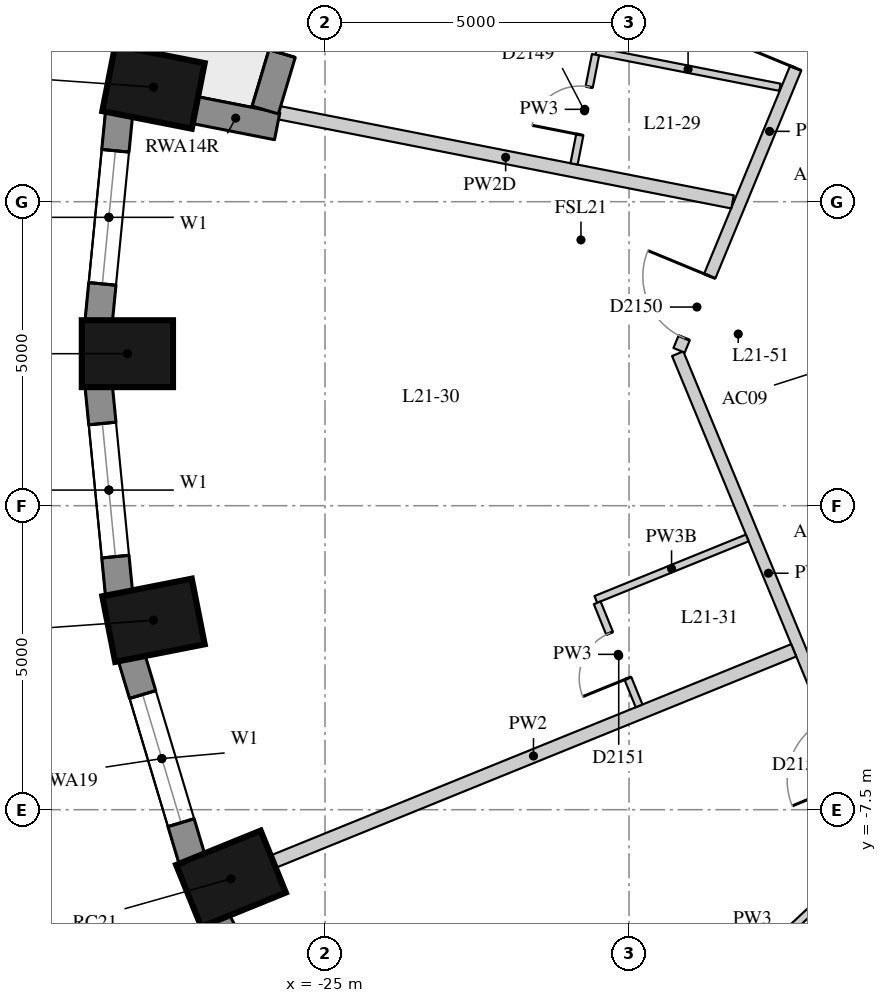
"""IFC4 building model, lengths in metres.
Left out: names, types, materials, properties, quantities, classifications, styles, units other than length and angle.
Written with IfcOpenShell. Run it as: python <this file> out.ifc"""

import sys

from ifc_helpers import new_model, si_unit, direction, frame, frame_2d, origin, origin_2d, place, context, subcontext, project, spatial, rectangle, extrude, element, fill, save


model = new_model("IFC4")
c1 = context("Model", 3, precision=1e-05, world=origin(), true_north=direction((0.0, 1.0)))
c2 = subcontext(c1, "Body", "Model", "MODEL_VIEW")
j1 = project(units=[si_unit("LENGTHUNIT", "METRE"), si_unit("PLANEANGLEUNIT", "RADIAN")], contexts=[c1])
p1 = place(None, origin())
s1 = spatial("IfcSite", under=j1, at=p1, CompositionType="ELEMENT")
p2 = place(p1, origin())
s2 = spatial("IfcBuilding", under=s1, at=p2, CompositionType="ELEMENT")
p3 = place(p2, frame((0.0, 0.0, 77.8)))
s3 = spatial("IfcBuildingStorey", under=s2, at=p3, CompositionType="ELEMENT", Elevation=77.8)
for number, where, z_axis, x_axis in (
    (1, (-27.821, 4.385, 0.0), (0.0, 0.0, 1.0), (-0.981, 0.193, 0.0)),
    (2, (-28.25, 0.0, 0.0), (0.0, 0.0, 1.0), (-1.0, 0.0, 0.0)),
    (3, (-27.821, -4.385, 0.0), (0.0, 0.0, 1.0), (-0.981, -0.193, 0.0)),
    (4, (-26.546, -8.636, 0.0), (0.0, 0.0, 1.0), (-0.927, -0.376, 0.0)),
):
    element("IfcColumn", number, at=place(p3, frame(where, z_axis=z_axis, x_axis=x_axis)), inside=s3, PredefinedType="COLUMN", context=c2, shape_type="SweptSolid", body=[
        extrude(rectangle(XDim=1.5, YDim=1.1, at=origin_2d()), origin(), (0.0, 0.0, 1.0), 3.3),
    ])
p4 = place(p3, frame((-28.387, 3.956, 0.0), z_axis=(0.0, 0.0, 1.0), x_axis=(-0.097389581596, -0.995246336038, 0.0)))
e5 = element("IfcWall", 5, at=p4, inside=s3, PredefinedType="SOLIDWALL", context=c2, shape_type="SweptSolid", body=[
    extrude(rectangle(XDim=3.442, YDim=0.45, at=frame_2d((1.721, 0.0))), origin(), (0.0, 0.0, 1.0), 3.02),
])
p5 = place(p4, frame((0.621, 0.0, 0.4)))
e6 = element("IfcOpeningElement", 6, at=p5, cuts=e5, PredefinedType="OPENING", context=c2, shape_type="SweptSolid", body=[
    extrude(rectangle(XDim=2.2, YDim=1.75, at=frame_2d((1.1, 0.875))), frame((0.0, 0.235, 0.0), z_axis=(0.0, -1.0, 0.0), x_axis=(1.0, 0.0, 0.0)), (0.0, 0.0, 1.0), 0.47),
])
p6 = place(p3, frame((-28.722, -0.53, 0.0), z_axis=(0.0, 0.0, 1.0), x_axis=(0.097389581596, -0.995246336038, 0.0)))
e7 = element("IfcWall", 7, at=p6, inside=s3, PredefinedType="SOLIDWALL", context=c2, shape_type="SweptSolid", body=[
    extrude(rectangle(XDim=3.442, YDim=0.45, at=frame_2d((1.721, 0.0))), origin(), (0.0, 0.0, 1.0), 3.02),
])
p7 = place(p6, frame((0.621, 0.0, 0.4)))
e8 = element("IfcOpeningElement", 8, at=p7, cuts=e7, PredefinedType="OPENING", context=c2, shape_type="SweptSolid", body=[
    extrude(rectangle(XDim=2.2, YDim=1.75, at=frame_2d((1.1, 0.875))), frame((0.0, 0.235, 0.0), z_axis=(0.0, -1.0, 0.0), x_axis=(1.0, 0.0, 0.0)), (0.0, 0.0, 1.0), 0.47),
])
p8 = place(p3, frame((-28.182, -4.996, 0.0), z_axis=(0.0, 0.0, 1.0), x_axis=(0.287064133733, -0.957911364963, 0.0)))
e9 = element("IfcWall", 9, at=p8, inside=s3, PredefinedType="SOLIDWALL", context=c2, shape_type="SweptSolid", body=[
    extrude(rectangle(XDim=3.473, YDim=0.45, at=frame_2d((1.737, 0.0))), origin(), (0.0, 0.0, 1.0), 3.02),
])
p9 = place(p8, frame((0.637, 0.0, 0.4)))
e10 = element("IfcOpeningElement", 10, at=p9, cuts=e9, PredefinedType="OPENING", context=c2, shape_type="SweptSolid", body=[
    extrude(rectangle(XDim=2.2, YDim=1.75, at=frame_2d((1.1, 0.875))), frame((0.0, 0.235, 0.0), z_axis=(0.0, -1.0, 0.0), x_axis=(1.0, 0.0, 0.0)), (0.0, 0.0, 1.0), 0.47),
])
p10 = place(p3, frame((-26.786, -9.305, 0.0), z_axis=(0.0, 0.0, 1.0), x_axis=(0.462492775226, -0.886623050041, 0.0)))
e11 = element("IfcWall", 11, at=p10, inside=s3, PredefinedType="SOLIDWALL", context=c2, shape_type="SweptSolid", body=[
    extrude(rectangle(XDim=3.532, YDim=0.45, at=frame_2d((1.766, 0.0))), origin(), (0.0, 0.0, 1.0), 3.02),
])
p11 = place(p10, frame((0.666, 0.0, 0.4)))
e12 = element("IfcOpeningElement", 12, at=p11, cuts=e11, PredefinedType="OPENING", context=c2, shape_type="SweptSolid", body=[
    extrude(rectangle(XDim=2.2, YDim=1.75, at=frame_2d((1.1, 0.875))), frame((0.0, 0.235, 0.0), z_axis=(0.0, -1.0, 0.0), x_axis=(1.0, 0.0, 0.0)), (0.0, 0.0, 1.0), 0.47),
])
p12 = place(p3, frame((-27.151, 4.009, 0.0), z_axis=(0.0, 0.0, 1.0), x_axis=(0.981197182729, -0.1930080014, 0.0)))
e13 = element("IfcWall", 13, at=p12, inside=s3, PredefinedType="SOLIDWALL", context=c2, shape_type="SweptSolid", body=[
    extrude(rectangle(XDim=1.39, YDim=0.45, at=frame_2d((0.695, 0.0))), origin(), (0.0, 0.0, 1.0), 2.47),
])
p13 = place(p3, frame((-24.812, 7.925, 0.0), z_axis=(0.0, 0.0, 1.0), x_axis=(-0.286389028326, -0.95811341941, 0.0)))
e14 = element("IfcWall", 14, at=p13, inside=s3, PredefinedType="SOLIDWALL", context=c2, shape_type="SweptSolid", body=[
    extrude(rectangle(XDim=4.088, YDim=0.45, at=frame_2d((2.044, 0.0))), origin(), (0.0, 0.0, 1.0), 3.02),
])
p14 = place(p13, frame((0.969, 0.0, 0.4)))
e15 = element("IfcOpeningElement", 15, at=p14, cuts=e14, PredefinedType="OPENING", context=c2, shape_type="SweptSolid", body=[
    extrude(rectangle(XDim=1.0, YDim=1.75, at=frame_2d((0.5, 0.875))), frame((0.0, 0.235, 0.0), z_axis=(0.0, -1.0, 0.0), x_axis=(1.0, 0.0, 0.0)), (0.0, 0.0, 1.0), 0.47),
])
p15 = place(p13, frame((2.119, 0.0, 0.0)))
e16 = element("IfcOpeningElement", 16, at=p15, cuts=e14, PredefinedType="OPENING", context=c2, shape_type="SweptSolid", body=[
    extrude(rectangle(XDim=1.0, YDim=2.15, at=frame_2d((0.5, 1.075))), frame((0.0, 0.235, 0.0), z_axis=(0.0, -1.0, 0.0), x_axis=(1.0, 0.0, 0.0)), (0.0, 0.0, 1.0), 0.47),
])
p16 = place(p3, frame((-16.215, -7.221, 0.0), z_axis=(0.0, 0.0, 1.0), x_axis=(-0.382000362846, 0.924162173423, 0.0)))
e17 = element("IfcWall", 17, at=p16, inside=s3, PredefinedType="PARTITIONING", context=c2, shape_type="SweptSolid", body=[
    extrude(rectangle(XDim=7.814, YDim=0.2, at=frame_2d((3.907, 0.0))), origin(), (0.0, 0.0, 1.0), 3.02),
])
p17 = place(p16, frame((0.22, 0.0, 0.0)))
e18 = element("IfcOpeningElement", 18, at=p17, cuts=e17, PredefinedType="OPENING", context=c2, shape_type="SweptSolid", body=[
    extrude(rectangle(XDim=1.1, YDim=2.1, at=frame_2d((0.55, 1.05))), frame((0.0, 0.11, 0.0), z_axis=(0.0, -1.0, 0.0), x_axis=(1.0, 0.0, 0.0)), (0.0, 0.0, 1.0), 0.22),
])
p18 = place(p3, frame((-19.177, 0.056, 0.0), z_axis=(0.0, 0.0, 1.0), x_axis=(0.382011450526, 0.924157590277, 0.0)))
e19 = element("IfcWall", 19, at=p18, inside=s3, PredefinedType="PARTITIONING", context=c2, shape_type="SweptSolid", body=[
    extrude(rectangle(XDim=7.794, YDim=0.2, at=frame_2d((3.897, 0.0))), origin(), (0.0, 0.0, 1.0), 3.02),
])
p19 = place(p18, frame((5.022, 0.0, 0.0)))
e20 = element("IfcOpeningElement", 20, at=p19, cuts=e19, PredefinedType="OPENING", context=c2, shape_type="SweptSolid", body=[
    extrude(rectangle(XDim=1.1, YDim=2.1, at=frame_2d((0.55, 1.05))), frame((0.0, 0.11, 0.0), z_axis=(0.0, -1.0, 0.0), x_axis=(1.0, 0.0, 0.0)), (0.0, 0.0, 1.0), 0.22),
])
p20 = place(p18, frame((0.22, 0.0, 0.0)))
e21 = element("IfcOpeningElement", 21, at=p20, cuts=e19, PredefinedType="OPENING", context=c2, shape_type="SweptSolid", body=[
    extrude(rectangle(XDim=1.1, YDim=2.1, at=frame_2d((0.55, 1.05))), frame((0.0, 0.11, 0.0), z_axis=(0.0, -1.0, 0.0), x_axis=(1.0, 0.0, 0.0)), (0.0, 0.0, 1.0), 0.22),
])
p21 = place(p3, frame((-25.761, 3.964, 0.0), z_axis=(0.0, 0.0, 1.0), x_axis=(0.981212489184, -0.192930171486, 0.0)))
e22 = element("IfcWall", 22, at=p21, inside=s3, PredefinedType="PARTITIONING", context=c2, shape_type="SweptSolid", body=[
    extrude(rectangle(XDim=7.606, YDim=0.22, at=frame_2d((3.803, 0.0))), origin(), (0.0, 0.0, 1.0), 2.47),
])
p22 = place(p3, frame((-25.851, -8.354, 0.0), z_axis=(0.0, 0.0, 1.0), x_axis=(0.926554383207, 0.376160836558, 0.0)))
e23 = element("IfcWall", 23, at=p22, inside=s3, PredefinedType="PARTITIONING", context=c2, shape_type="SweptSolid", body=[
    extrude(rectangle(XDim=9.238, YDim=0.22, at=frame_2d((4.619, 0.0))), origin(), (0.0, 0.0, 1.0), 3.02),
])
p23 = place(p3, frame((-17.518, 4.382, 0.0), z_axis=(0.0, 0.0, 1.0), x_axis=(-0.981212916867, 0.192927996342, 0.0)))
e24 = element("IfcWall", 24, at=p23, inside=s3, PredefinedType="PARTITIONING", context=c2, shape_type="SweptSolid", body=[
    extrude(rectangle(XDim=3.079, YDim=0.12, at=frame_2d((1.54, 0.0))), origin(), (0.0, 0.0, 1.0), 3.02),
])
p24 = place(p3, frame((-18.056, -3.031, 0.0), z_axis=(0.0, 0.0, 1.0), x_axis=(-0.926540804766, -0.376194281061, 0.0)))
e25 = element("IfcWall", 25, at=p24, inside=s3, PredefinedType="PARTITIONING", context=c2, shape_type="SweptSolid", body=[
    extrude(rectangle(XDim=2.688, YDim=0.12, at=frame_2d((1.344, 0.0))), origin(), (0.0, 0.0, 1.0), 2.47),
])
p25 = place(p3, frame((-16.329, -8.52, 0.0), z_axis=(0.0, 0.0, 1.0), x_axis=(-0.730102689118, -0.68333744471, 0.0)))
e26 = element("IfcWall", 26, at=p25, inside=s3, PredefinedType="PARTITIONING", context=c2, shape_type="SweptSolid", body=[
    extrude(rectangle(XDim=4.495, YDim=0.12, at=frame_2d((2.248, 0.0))), origin(), (0.0, 0.0, 1.0), 3.02),
])
p26 = place(p3, frame((-20.551, 4.917, 0.0), z_axis=(0.0, 0.0, 1.0), x_axis=(-0.19288291118, -0.981221780524, 0.0)))
e27 = element("IfcWall", 27, at=p26, inside=s3, PredefinedType="PARTITIONING", context=c2, shape_type="SweptSolid", body=[
    extrude(rectangle(XDim=1.83, YDim=0.12, at=frame_2d((0.915, 0.0))), origin(), (0.0, 0.0, 1.0), 3.02),
])
p27 = place(p26, frame((0.54, 0.0, 0.0)))
e28 = element("IfcOpeningElement", 28, at=p27, cuts=e27, PredefinedType="OPENING", context=c2, shape_type="SweptSolid", body=[
    extrude(rectangle(XDim=0.8, YDim=2.1, at=frame_2d((0.4, 1.05))), frame((0.0, 0.07, 0.0), z_axis=(0.0, -1.0, 0.0), x_axis=(1.0, 0.0, 0.0)), (0.0, 0.0, 1.0), 0.14),
])
p28 = place(p3, frame((-20.523, -4.097, 0.0), z_axis=(0.0, 0.0, 1.0), x_axis=(0.376216010002, -0.92653198208, 0.0)))
e29 = element("IfcWall", 29, at=p28, inside=s3, PredefinedType="PARTITIONING", context=c2, shape_type="SweptSolid", body=[
    extrude(rectangle(XDim=1.83, YDim=0.12, at=frame_2d((0.915, 0.0))), origin(), (0.0, 0.0, 1.0), 3.02),
])
p29 = place(p28, frame((0.54, 0.0, 0.0)))
e30 = element("IfcOpeningElement", 30, at=p29, cuts=e29, PredefinedType="OPENING", context=c2, shape_type="SweptSolid", body=[
    extrude(rectangle(XDim=0.8, YDim=2.1, at=frame_2d((0.4, 1.05))), frame((0.0, 0.07, 0.0), z_axis=(0.0, -1.0, 0.0), x_axis=(1.0, 0.0, 0.0)), (0.0, 0.0, 1.0), 0.14),
])
p30 = place(p5, origin())
e31 = element("IfcWindow", 31, at=p30, inside=s3, PartitioningType="SINGLE_PANEL", PredefinedType="WINDOW", context=c2, shape_type="SweptSolid", body=[
    extrude(rectangle(XDim=2.2, YDim=1.75, at=frame_2d((1.1, 0.875))), frame((0.0, 0.035, 0.0), z_axis=(0.0, -1.0, 0.0), x_axis=(1.0, 0.0, 0.0)), (0.0, 0.0, 1.0), 0.06),
])
fill(e6, e31)
p31 = place(p7, origin())
e32 = element("IfcWindow", 32, at=p31, inside=s3, PartitioningType="SINGLE_PANEL", PredefinedType="WINDOW", context=c2, shape_type="SweptSolid", body=[
    extrude(rectangle(XDim=2.2, YDim=1.75, at=frame_2d((1.1, 0.875))), frame((0.0, 0.035, 0.0), z_axis=(0.0, -1.0, 0.0), x_axis=(1.0, 0.0, 0.0)), (0.0, 0.0, 1.0), 0.06),
])
fill(e8, e32)
p32 = place(p9, origin())
e33 = element("IfcWindow", 33, at=p32, inside=s3, PartitioningType="SINGLE_PANEL", PredefinedType="WINDOW", context=c2, shape_type="SweptSolid", body=[
    extrude(rectangle(XDim=2.2, YDim=1.75, at=frame_2d((1.1, 0.875))), frame((0.0, 0.035, 0.0), z_axis=(0.0, -1.0, 0.0), x_axis=(1.0, 0.0, 0.0)), (0.0, 0.0, 1.0), 0.06),
])
fill(e10, e33)
p33 = place(p15, frame((1.0, 0.0, 0.0), z_axis=(0.0, 0.0, 1.0), x_axis=(-1.0, 0.0, 0.0)))
e34 = element("IfcDoor", 34, at=p33, inside=s3, OperationType="SINGLE_SWING_LEFT", PredefinedType="DOOR", context=c2, shape_type="SweptSolid", body=[
    extrude(rectangle(XDim=1.0, YDim=2.15, at=frame_2d((0.5, 1.075))), frame((0.0, 0.075, 0.0), z_axis=(0.0, -1.0, 0.0), x_axis=(1.0, 0.0, 0.0)), (0.0, 0.0, 1.0), 0.05),
])
fill(e16, e34)
p34 = place(p19, origin())
e35 = element("IfcDoor", 35, at=p34, inside=s3, OperationType="SINGLE_SWING_LEFT", PredefinedType="DOOR", context=c2, shape_type="SweptSolid", body=[
    extrude(rectangle(XDim=1.1, YDim=2.1, at=frame_2d((0.55, 1.05))), frame((0.0, 0.025, 0.0), z_axis=(0.0, -1.0, 0.0), x_axis=(1.0, 0.0, 0.0)), (0.0, 0.0, 1.0), 0.05),
])
fill(e20, e35)
p35 = place(p27, origin())
e36 = element("IfcDoor", 36, at=p35, inside=s3, OperationType="SINGLE_SWING_LEFT", PredefinedType="DOOR", context=c2, shape_type="SweptSolid", body=[
    extrude(rectangle(XDim=0.8, YDim=2.1, at=frame_2d((0.4, 1.05))), frame((0.0, 0.025, 0.0), z_axis=(0.0, -1.0, 0.0), x_axis=(1.0, 0.0, 0.0)), (0.0, 0.0, 1.0), 0.05),
])
fill(e28, e36)
p36 = place(p20, origin())
e37 = element("IfcDoor", 37, at=p36, inside=s3, OperationType="SINGLE_SWING_RIGHT", PredefinedType="DOOR", context=c2, shape_type="SweptSolid", body=[
    extrude(rectangle(XDim=1.1, YDim=2.1, at=frame_2d((0.55, 1.05))), frame((0.0, 0.025, 0.0), z_axis=(0.0, -1.0, 0.0), x_axis=(1.0, 0.0, 0.0)), (0.0, 0.0, 1.0), 0.05),
])
fill(e21, e37)
p37 = place(p29, origin())
e38 = element("IfcDoor", 38, at=p37, inside=s3, OperationType="SINGLE_SWING_LEFT", PredefinedType="DOOR", context=c2, shape_type="SweptSolid", body=[
    extrude(rectangle(XDim=0.8, YDim=2.1, at=frame_2d((0.4, 1.05))), frame((0.0, 0.025, 0.0), z_axis=(0.0, -1.0, 0.0), x_axis=(1.0, 0.0, 0.0)), (0.0, 0.0, 1.0), 0.05),
])
fill(e30, e38)
save(model, sys.argv[1])
